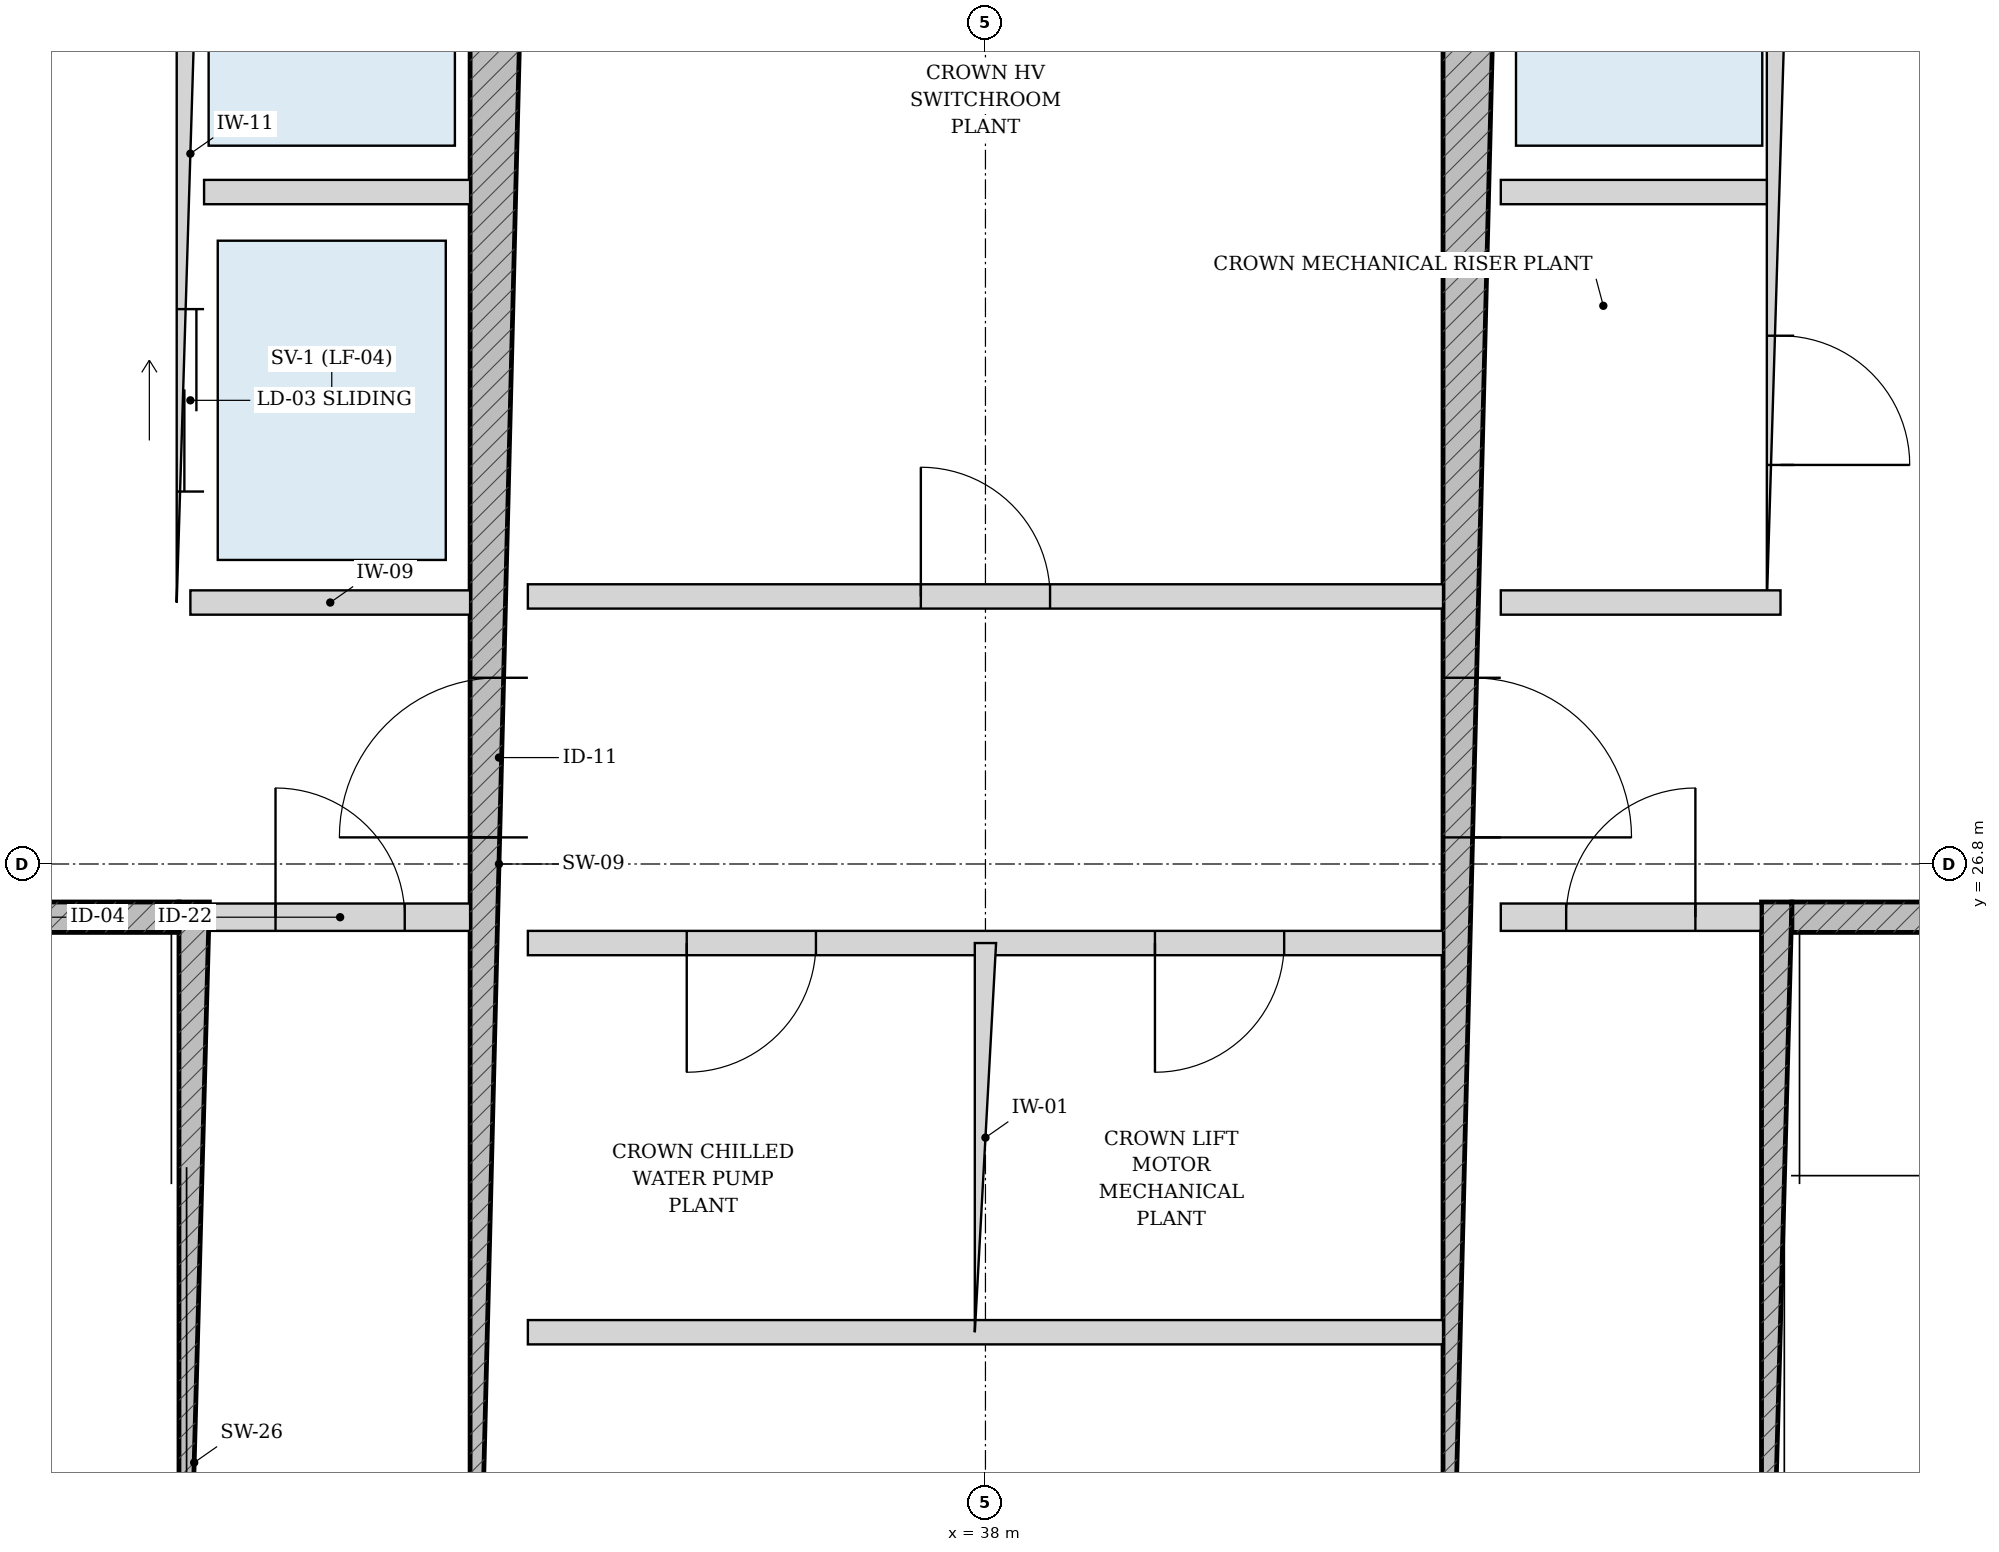
"""IFC4 building model, lengths in metres.
Left out: names, types, materials, properties, quantities, classifications, styles, units other than length and angle.
Written with IfcOpenShell. Run it as: python <this file> out.ifc"""

import sys

from ifc_helpers import new_model, si_unit, direction, frame, frame_2d, origin, place, context, subcontext, project, spatial, rectangle, extrude, source, transform, mapped, element, fill, save


model = new_model("IFC4")
c1 = context("Model", 3, precision=1e-05, world=origin(), true_north=direction((-0.2419218956, 0.970295726276)))
c2 = subcontext(c1, "Body", "Model", "MODEL_VIEW")
j1 = project(units=[si_unit("LENGTHUNIT", "METRE"), si_unit("PLANEANGLEUNIT", "RADIAN")], contexts=[c1])
p1 = place(None, origin())
s1 = spatial("IfcSite", under=j1, at=p1, CompositionType="ELEMENT")
p2 = place(p1, origin())
s2 = spatial("IfcBuilding", under=s1, at=p2, CompositionType="ELEMENT")
p3 = place(p2, frame((0.0, 0.0, 332.1)))
s3 = spatial("IfcBuildingStorey", under=s2, at=p3, CompositionType="ELEMENT", Elevation=332.1)
p4 = place(p3, frame((32.795, 19.175, 0.0), z_axis=(0.0, 0.0, 1.0), x_axis=(0.0, 1.0, 0.0)))
e1 = element("IfcWall", 1, at=p4, inside=s3, PredefinedType="SOLIDWALL", context=c2, shape_type="SweptSolid", body=[
    extrude(rectangle(XDim=7.375, YDim=0.2, at=frame_2d((3.688, 0.0))), origin(), (0.0, 0.0, 1.0), 4.85),
])
p5 = place(p3, frame((29.375, 26.45, 0.0), z_axis=(0.0, 0.0, 1.0), x_axis=(1.0, 0.0, 0.0)))
e2 = element("IfcWall", 2, at=p5, inside=s3, PredefinedType="SOLIDWALL", context=c2, shape_type="SweptSolid", body=[
    extrude(rectangle(XDim=3.32, YDim=0.2, at=frame_2d((1.66, 0.0))), origin(), (0.0, 0.0, 1.0), 4.85),
])
p6 = place(p5, frame((1.185, 0.0, 0.0)))
e3 = element("IfcOpeningElement", 3, at=p6, cuts=e2, PredefinedType="OPENING", context=c2, shape_type="SweptSolid", body=[
    extrude(rectangle(XDim=0.95, YDim=2.15, at=frame_2d((0.475, 1.075))), frame((0.0, 0.11, 0.0), z_axis=(0.0, -1.0, 0.0), x_axis=(1.0, 0.0, 0.0)), (0.0, 0.0, 1.0), 0.22),
])
p7 = place(p3, frame((43.205, 19.175, 0.0), z_axis=(0.0, 0.0, 1.0), x_axis=(0.0, 1.0, 0.0)))
e4 = element("IfcWall", 4, at=p7, inside=s3, PredefinedType="SOLIDWALL", context=c2, shape_type="SweptSolid", body=[
    extrude(rectangle(XDim=7.375, YDim=0.2, at=frame_2d((3.688, 0.0))), origin(), (0.0, 0.0, 1.0), 4.85),
])
p8 = place(p3, frame((43.305, 26.45, 0.0), z_axis=(0.0, 0.0, 1.0), x_axis=(1.0, 0.0, 0.0)))
e5 = element("IfcWall", 5, at=p8, inside=s3, PredefinedType="SOLIDWALL", context=c2, shape_type="SweptSolid", body=[
    extrude(rectangle(XDim=3.32, YDim=0.2, at=frame_2d((1.66, 0.0))), origin(), (0.0, 0.0, 1.0), 4.85),
])
p9 = place(p8, frame((1.185, 0.0, 0.0)))
e6 = element("IfcOpeningElement", 6, at=p9, cuts=e5, PredefinedType="OPENING", context=c2, shape_type="SweptSolid", body=[
    extrude(rectangle(XDim=0.95, YDim=2.15, at=frame_2d((0.475, 1.075))), frame((0.0, 0.11, 0.0), z_axis=(0.0, -1.0, 0.0), x_axis=(1.0, 0.0, 0.0)), (0.0, 0.0, 1.0), 0.22),
])
p10 = place(p3, frame((34.8, 19.175, 0.0), z_axis=(0.0, 0.0, 1.0), x_axis=(0.0, 1.0, 0.0)))
e7 = element("IfcWall", 7, at=p10, inside=s3, PredefinedType="SHEAR", context=c2, shape_type="SweptSolid", body=[
    extrude(rectangle(XDim=15.25, YDim=0.38, at=frame_2d((7.625, 0.0))), origin(), (0.0, 0.0, 1.0), 4.85),
])
p11 = place(p10, frame((7.8, 0.0, 0.0)))
e8 = element("IfcOpeningElement", 8, at=p11, cuts=e7, PredefinedType="OPENING", context=c2, shape_type="SweptSolid", body=[
    extrude(rectangle(XDim=1.05, YDim=2.15, at=frame_2d((0.525, 1.075))), frame((0.0, 0.2, 0.0), z_axis=(0.0, -1.0, 0.0), x_axis=(1.0, 0.0, 0.0)), (0.0, 0.0, 1.0), 0.4),
])
p12 = place(p3, frame((41.2, 19.175, 0.0), z_axis=(0.0, 0.0, 1.0), x_axis=(0.0, 1.0, 0.0)))
e9 = element("IfcWall", 9, at=p12, inside=s3, PredefinedType="SHEAR", context=c2, shape_type="SweptSolid", body=[
    extrude(rectangle(XDim=15.25, YDim=0.38, at=frame_2d((7.625, 0.0))), origin(), (0.0, 0.0, 1.0), 4.85),
])
p13 = place(p12, frame((7.8, 0.0, 0.0)))
e10 = element("IfcOpeningElement", 10, at=p13, cuts=e9, PredefinedType="OPENING", context=c2, shape_type="SweptSolid", body=[
    extrude(rectangle(XDim=1.05, YDim=2.15, at=frame_2d((0.525, 1.075))), frame((0.0, 0.2, 0.0), z_axis=(0.0, -1.0, 0.0), x_axis=(1.0, 0.0, 0.0)), (0.0, 0.0, 1.0), 0.4),
])
p14 = place(p3, frame((32.9, 26.45, 0.0), z_axis=(0.0, 0.0, 1.0), x_axis=(1.0, 0.0, 0.0)))
e11 = element("IfcWall", 11, at=p14, inside=s3, PredefinedType="PARTITIONING", context=c2, shape_type="SweptSolid", body=[
    extrude(rectangle(XDim=1.71, YDim=0.18, at=frame_2d((0.855, 0.0))), origin(), (0.0, 0.0, 1.0), 4.85),
])
p15 = place(p14, frame((0.43, 0.0, 0.0)))
e12 = element("IfcOpeningElement", 12, at=p15, cuts=e11, PredefinedType="OPENING", context=c2, shape_type="SweptSolid", body=[
    extrude(rectangle(XDim=0.85, YDim=2.1, at=frame_2d((0.425, 1.05))), frame((0.0, 0.1, 0.0), z_axis=(0.0, -1.0, 0.0), x_axis=(1.0, 0.0, 0.0)), (0.0, 0.0, 1.0), 0.2),
])
p16 = place(p3, frame((41.39, 26.45, 0.0), z_axis=(0.0, 0.0, 1.0), x_axis=(1.0, 0.0, 0.0)))
e13 = element("IfcWall", 13, at=p16, inside=s3, PredefinedType="PARTITIONING", context=c2, shape_type="SweptSolid", body=[
    extrude(rectangle(XDim=1.71, YDim=0.18, at=frame_2d((0.855, 0.0))), origin(), (0.0, 0.0, 1.0), 4.85),
])
p17 = place(p16, frame((0.43, 0.0, 0.0)))
e14 = element("IfcOpeningElement", 14, at=p17, cuts=e13, PredefinedType="OPENING", context=c2, shape_type="SweptSolid", body=[
    extrude(rectangle(XDim=0.85, YDim=2.1, at=frame_2d((0.425, 1.05))), frame((0.0, 0.1, 0.0), z_axis=(0.0, -1.0, 0.0), x_axis=(1.0, 0.0, 0.0)), (0.0, 0.0, 1.0), 0.2),
])
p18 = place(p3, frame((32.77, 28.52, 0.0), z_axis=(0.0, 0.0, 1.0), x_axis=(0.0, 1.0, 0.0)))
e15 = element("IfcWall", 15, at=p18, inside=s3, PredefinedType="PARTITIONING", context=c2, shape_type="SweptSolid", body=[
    extrude(rectangle(XDim=5.905, YDim=0.18, at=frame_2d((2.953, 0.0))), origin(), (0.0, 0.0, 1.0), 4.85),
])
p19 = place(p18, frame((3.655, 0.0, 0.0)))
e16 = element("IfcOpeningElement", 16, at=p19, cuts=e15, PredefinedType="OPENING", context=c2, shape_type="SweptSolid", body=[
    extrude(rectangle(XDim=1.15, YDim=2.2, at=frame_2d((0.575, 1.1))), frame((0.0, 0.1, 0.0), z_axis=(0.0, -1.0, 0.0), x_axis=(1.0, 0.0, 0.0)), (0.0, 0.0, 1.0), 0.2),
])
p20 = place(p18, frame((0.73, 0.0, 0.0)))
e17 = element("IfcOpeningElement", 17, at=p20, cuts=e15, PredefinedType="OPENING", context=c2, shape_type="SweptSolid", body=[
    extrude(rectangle(XDim=1.2, YDim=2.25, at=frame_2d((0.6, 1.125))), frame((0.0, 0.1, 0.0), z_axis=(0.0, -1.0, 0.0), x_axis=(1.0, 0.0, 0.0)), (0.0, 0.0, 1.0), 0.2),
])
p21 = place(p3, frame((32.86, 31.22, 0.0), z_axis=(0.0, 0.0, 1.0), x_axis=(1.0, 0.0, 0.0)))
e18 = element("IfcWall", 18, at=p21, inside=s3, PredefinedType="PARTITIONING", context=c2, shape_type="SweptSolid", body=[
    extrude(rectangle(XDim=1.75, YDim=0.16, at=frame_2d((0.875, 0.0))), origin(), (0.0, 0.0, 1.0), 4.85),
])
p22 = place(p3, frame((32.77, 28.52, 0.0), z_axis=(0.0, 0.0, 1.0), x_axis=(1.0, 0.0, 0.0)))
e19 = element("IfcWall", 19, at=p22, inside=s3, PredefinedType="PARTITIONING", context=c2, shape_type="SweptSolid", body=[
    extrude(rectangle(XDim=1.84, YDim=0.16, at=frame_2d((0.92, 0.0))), origin(), (0.0, 0.0, 1.0), 4.85),
])
p23 = place(p3, frame((43.23, 28.52, 0.0), z_axis=(0.0, 0.0, 1.0), x_axis=(0.0, 1.0, 0.0)))
e20 = element("IfcWall", 20, at=p23, inside=s3, PredefinedType="PARTITIONING", context=c2, shape_type="SweptSolid", body=[
    extrude(rectangle(XDim=5.905, YDim=0.18, at=frame_2d((2.953, 0.0))), origin(), (0.0, 0.0, 1.0), 4.85),
])
p24 = place(p23, frame((0.905, 0.0, 0.0)))
e21 = element("IfcOpeningElement", 21, at=p24, cuts=e20, PredefinedType="OPENING", context=c2, shape_type="SweptSolid", body=[
    extrude(rectangle(XDim=0.85, YDim=2.1, at=frame_2d((0.425, 1.05))), frame((0.0, 0.1, 0.0), z_axis=(0.0, -1.0, 0.0), x_axis=(1.0, 0.0, 0.0)), (0.0, 0.0, 1.0), 0.2),
])
p25 = place(p23, frame((3.655, 0.0, 0.0)))
e22 = element("IfcOpeningElement", 22, at=p25, cuts=e20, PredefinedType="OPENING", context=c2, shape_type="SweptSolid", body=[
    extrude(rectangle(XDim=1.15, YDim=2.2, at=frame_2d((0.575, 1.1))), frame((0.0, 0.1, 0.0), z_axis=(0.0, -1.0, 0.0), x_axis=(1.0, 0.0, 0.0)), (0.0, 0.0, 1.0), 0.2),
])
p26 = place(p3, frame((41.39, 31.22, 0.0), z_axis=(0.0, 0.0, 1.0), x_axis=(1.0, 0.0, 0.0)))
e23 = element("IfcWall", 23, at=p26, inside=s3, PredefinedType="PARTITIONING", context=c2, shape_type="SweptSolid", body=[
    extrude(rectangle(XDim=1.75, YDim=0.16, at=frame_2d((0.875, 0.0))), origin(), (0.0, 0.0, 1.0), 4.85),
])
p27 = place(p3, frame((41.39, 28.52, 0.0), z_axis=(0.0, 0.0, 1.0), x_axis=(1.0, 0.0, 0.0)))
e24 = element("IfcWall", 24, at=p27, inside=s3, PredefinedType="PARTITIONING", context=c2, shape_type="SweptSolid", body=[
    extrude(rectangle(XDim=1.84, YDim=0.16, at=frame_2d((0.92, 0.0))), origin(), (0.0, 0.0, 1.0), 4.85),
])
p28 = place(p3, frame((34.99, 28.56, 0.0), z_axis=(0.0, 0.0, 1.0), x_axis=(1.0, 0.0, 0.0)))
e25 = element("IfcWall", 25, at=p28, inside=s3, PredefinedType="PARTITIONING", context=c2, shape_type="SweptSolid", body=[
    extrude(rectangle(XDim=6.02, YDim=0.16, at=frame_2d((3.01, 0.0))), origin(), (0.0, 0.0, 1.0), 4.85),
])
p29 = place(p28, frame((2.585, 0.0, 0.0)))
e26 = element("IfcOpeningElement", 26, at=p29, cuts=e25, PredefinedType="OPENING", context=c2, shape_type="SweptSolid", body=[
    extrude(rectangle(XDim=0.85, YDim=2.1, at=frame_2d((0.425, 1.05))), frame((0.0, 0.09, 0.0), z_axis=(0.0, -1.0, 0.0), x_axis=(1.0, 0.0, 0.0)), (0.0, 0.0, 1.0), 0.18),
])
p30 = place(p3, frame((34.99, 26.28, 0.0), z_axis=(0.0, 0.0, 1.0), x_axis=(1.0, 0.0, 0.0)))
e27 = element("IfcWall", 27, at=p30, inside=s3, PredefinedType="PARTITIONING", context=c2, shape_type="SweptSolid", body=[
    extrude(rectangle(XDim=6.02, YDim=0.16, at=frame_2d((3.01, 0.0))), origin(), (0.0, 0.0, 1.0), 4.85),
])
p31 = place(p30, frame((1.045, 0.0, 0.0)))
e28 = element("IfcOpeningElement", 28, at=p31, cuts=e27, PredefinedType="OPENING", context=c2, shape_type="SweptSolid", body=[
    extrude(rectangle(XDim=0.85, YDim=2.1, at=frame_2d((0.425, 1.05))), frame((0.0, 0.09, 0.0), z_axis=(0.0, -1.0, 0.0), x_axis=(1.0, 0.0, 0.0)), (0.0, 0.0, 1.0), 0.18),
])
p32 = place(p30, frame((4.125, 0.0, 0.0)))
e29 = element("IfcOpeningElement", 29, at=p32, cuts=e27, PredefinedType="OPENING", context=c2, shape_type="SweptSolid", body=[
    extrude(rectangle(XDim=0.85, YDim=2.1, at=frame_2d((0.425, 1.05))), frame((0.0, 0.09, 0.0), z_axis=(0.0, -1.0, 0.0), x_axis=(1.0, 0.0, 0.0)), (0.0, 0.0, 1.0), 0.18),
])
p33 = place(p3, frame((34.99, 23.72, 0.0), z_axis=(0.0, 0.0, 1.0), x_axis=(1.0, 0.0, 0.0)))
e30 = element("IfcWall", 30, at=p33, inside=s3, PredefinedType="PARTITIONING", context=c2, shape_type="SweptSolid", body=[
    extrude(rectangle(XDim=6.02, YDim=0.16, at=frame_2d((3.01, 0.0))), origin(), (0.0, 0.0, 1.0), 4.85),
])
p34 = place(p3, frame((38.0, 23.72, 0.0), z_axis=(0.0, 0.0, 1.0), x_axis=(0.0, 1.0, 0.0)))
e31 = element("IfcWall", 31, at=p34, inside=s3, PredefinedType="PARTITIONING", context=c2, shape_type="SweptSolid", body=[
    extrude(rectangle(XDim=2.56, YDim=0.14, at=frame_2d((1.28, 0.0))), origin(), (0.0, 0.0, 1.0), 4.85),
])
m1 = source(origin(), c2, "Body", "SweptSolid", [
    extrude(rectangle(XDim=1.05, YDim=2.15, at=frame_2d((0.525, 1.075))), frame((0.0, 0.025, 0.0), z_axis=(0.0, -1.0, 0.0), x_axis=(1.0, 0.0, 0.0)), (0.0, 0.0, 1.0), 0.05),
])
p35 = place(p11, origin())
e32 = element("IfcDoor", 32, at=p35, inside=s3, OperationType="SINGLE_SWING_LEFT", PredefinedType="DOOR", context=c2, shape_type="MappedRepresentation", body=[
    mapped(m1, transform((0.0, 0.0, 0.0), scale=1.0)),
])
fill(e8, e32)
p36 = place(p13, frame((1.05, 0.0, 0.0), z_axis=(0.0, 0.0, 1.0), x_axis=(-1.0, 0.0, 0.0)))
e33 = element("IfcDoor", 33, at=p36, inside=s3, OperationType="SINGLE_SWING_RIGHT", PredefinedType="DOOR", context=c2, shape_type="MappedRepresentation", body=[
    mapped(m1, transform((0.0, 0.0, 0.0), scale=1.0)),
])
fill(e10, e33)
m2 = source(origin(), c2, "Body", "SweptSolid", [
    extrude(rectangle(XDim=0.85, YDim=2.1, at=frame_2d((0.425, 1.05))), frame((0.0, 0.025, 0.0), z_axis=(0.0, -1.0, 0.0), x_axis=(1.0, 0.0, 0.0)), (0.0, 0.0, 1.0), 0.05),
])
p37 = place(p15, origin())
e34 = element("IfcDoor", 34, at=p37, inside=s3, OperationType="SINGLE_SWING_LEFT", PredefinedType="DOOR", context=c2, shape_type="MappedRepresentation", body=[
    mapped(m2, transform((0.0, 0.0, 0.0), scale=1.0)),
])
fill(e12, e34)
p38 = place(p17, origin())
e35 = element("IfcDoor", 35, at=p38, inside=s3, OperationType="SINGLE_SWING_RIGHT", PredefinedType="DOOR", context=c2, shape_type="MappedRepresentation", body=[
    mapped(m2, transform((0.0, 0.0, 0.0), scale=1.0)),
])
fill(e14, e35)
p39 = place(p24, frame((0.85, 0.0, 0.0), z_axis=(0.0, 0.0, 1.0), x_axis=(-1.0, 0.0, 0.0)))
e36 = element("IfcDoor", 36, at=p39, inside=s3, OperationType="SINGLE_SWING_RIGHT", PredefinedType="DOOR", context=c2, shape_type="MappedRepresentation", body=[
    mapped(m2, transform((0.0, 0.0, 0.0), scale=1.0)),
])
fill(e21, e36)
p40 = place(p29, origin())
e37 = element("IfcDoor", 37, at=p40, inside=s3, OperationType="SINGLE_SWING_LEFT", PredefinedType="DOOR", context=c2, shape_type="MappedRepresentation", body=[
    mapped(m2, transform((0.0, 0.0, 0.0), scale=1.0)),
])
fill(e26, e37)
p41 = place(p31, frame((0.85, 0.0, 0.0), z_axis=(0.0, 0.0, 1.0), x_axis=(-1.0, 0.0, 0.0)))
e38 = element("IfcDoor", 38, at=p41, inside=s3, OperationType="SINGLE_SWING_RIGHT", PredefinedType="DOOR", context=c2, shape_type="MappedRepresentation", body=[
    mapped(m2, transform((0.0, 0.0, 0.0), scale=1.0)),
])
fill(e28, e38)
p42 = place(p32, frame((0.85, 0.0, 0.0), z_axis=(0.0, 0.0, 1.0), x_axis=(-1.0, 0.0, 0.0)))
e39 = element("IfcDoor", 39, at=p42, inside=s3, OperationType="SINGLE_SWING_RIGHT", PredefinedType="DOOR", context=c2, shape_type="MappedRepresentation", body=[
    mapped(m2, transform((0.0, 0.0, 0.0), scale=1.0)),
])
fill(e29, e39)
m3 = source(origin(), c2, "Body", "SweptSolid", [
    extrude(rectangle(XDim=1.2, YDim=2.25, at=frame_2d((0.6, 1.125))), frame((0.0, 0.025, 0.0), z_axis=(0.0, -1.0, 0.0), x_axis=(1.0, 0.0, 0.0)), (0.0, 0.0, 1.0), 0.05),
])
p43 = place(p20, origin())
e40 = element("IfcDoor", 40, at=p43, inside=s3, OperationType="DOUBLE_DOOR_SLIDING", PredefinedType="DOOR", context=c2, shape_type="MappedRepresentation", body=[
    mapped(m3, transform((0.0, 0.0, 0.0), scale=1.0)),
])
fill(e17, e40)
save(model, sys.argv[1])
